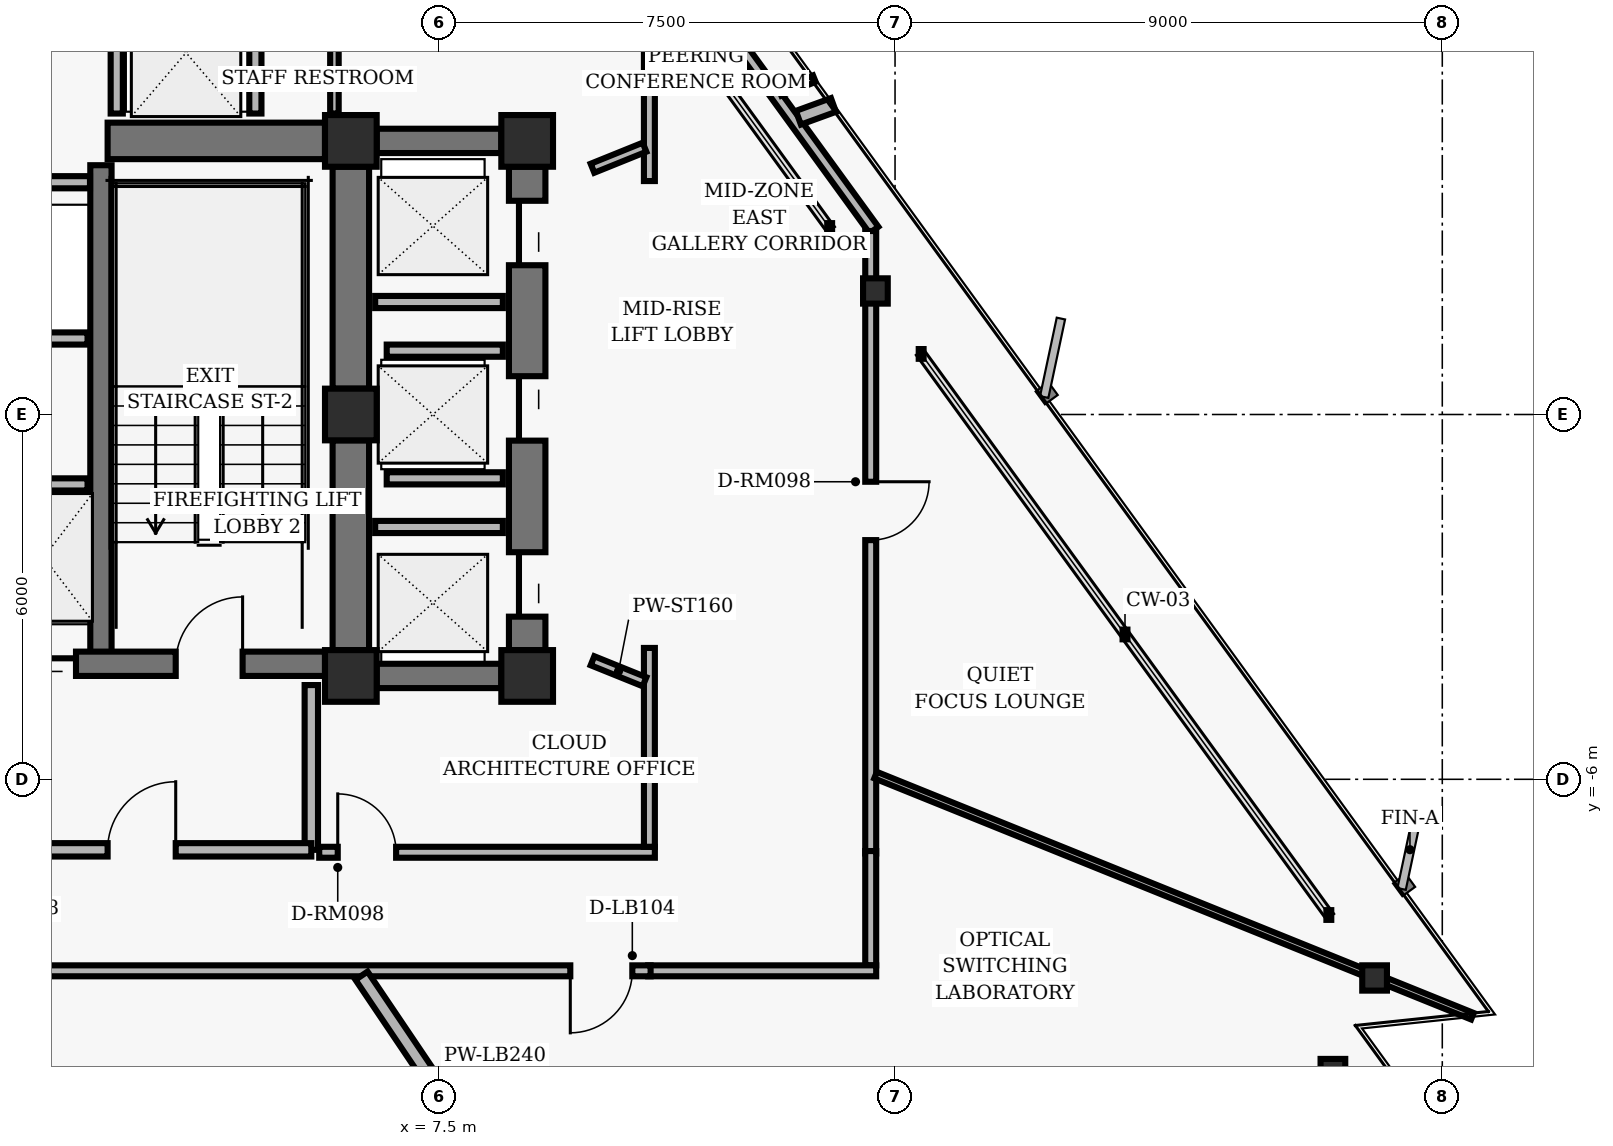
"""IFC4 building model, lengths in metres.
Left out: names, types, materials, properties, quantities, classifications, styles, units other than length and angle.
Written with IfcOpenShell. Run it as: python <this file> out.ifc"""

import sys

from ifc_helpers import new_model, si_unit, direction, frame, frame_2d, origin, origin_2d, place, context, subcontext, project, spatial, rectangle, hollow_rectangle, i_section, extrude, element, fill, save


model = new_model("IFC4")
c1 = context("Model", 3, precision=1e-05, world=origin(), true_north=direction((0.0, 1.0)))
c2 = subcontext(c1, "Body", "Model", "MODEL_VIEW")
j1 = project(units=[si_unit("LENGTHUNIT", "METRE"), si_unit("PLANEANGLEUNIT", "RADIAN")], contexts=[c1])
p1 = place(None, origin())
s1 = spatial("IfcSite", under=j1, at=p1, CompositionType="ELEMENT")
p2 = place(p1, origin())
s2 = spatial("IfcBuilding", under=s1, at=p2, CompositionType="ELEMENT")
p3 = place(p2, frame((0.0, 0.0, 122.88)))
s3 = spatial("IfcBuildingStorey", under=s2, at=p3, CompositionType="ELEMENT", Elevation=122.88)
for number, where, z_axis, x_axis in (
    (1, (6.05, 4.5, 0.0), (0.0, 0.0, 1.0), (1.0, 0.0, 0.0)),
    (2, (6.05, 0.0, 0.0), (0.0, 0.0, 1.0), (1.0, 0.0, 0.0)),
    (3, (6.05, -4.3, 0.0), (0.0, 0.0, 1.0), (1.0, 0.0, 0.0)),
    (4, (8.95, 4.5, 0.0), (0.0, 0.0, 1.0), (1.0, 0.0, 0.0)),
    (5, (8.95, -4.3, 0.0), (0.0, 0.0, 1.0), (1.0, 0.0, 0.0)),
):
    element("IfcColumn", number, at=place(p3, frame(where, z_axis=z_axis, x_axis=x_axis)), inside=s3, PredefinedType="COLUMN", context=c2, shape_type="SweptSolid", body=[
        extrude(hollow_rectangle(XDim=0.85, YDim=0.85, WallThickness=0.055, InnerFilletRadius=0.02, OuterFilletRadius=0.04, at=origin_2d()), origin(), (0.0, 0.0, 1.0), 3.04),
    ])
p4 = place(p3, frame((6.05, 0.425, 0.0), z_axis=(0.0, 0.0, 1.0), x_axis=(0.0, 1.0, 0.0)))
e6 = element("IfcWall", 6, at=p4, inside=s3, PredefinedType="SHEAR", context=c2, shape_type="SweptSolid", body=[
    extrude(rectangle(XDim=3.65, YDim=0.6, at=frame_2d((1.825, 0.0))), origin(), (0.0, 0.0, 1.0), 2.618),
])
p5 = place(p3, frame((6.05, -3.875, 0.0), z_axis=(0.0, 0.0, 1.0), x_axis=(0.0, 1.0, 0.0)))
e7 = element("IfcWall", 7, at=p5, inside=s3, PredefinedType="SHEAR", context=c2, shape_type="SweptSolid", body=[
    extrude(rectangle(XDim=3.45, YDim=0.6, at=frame_2d((1.725, 0.0))), origin(), (0.0, 0.0, 1.0), 2.618),
])
p6 = place(p3, frame((1.94, -4.1, 0.0), z_axis=(0.0, 0.0, 1.0), x_axis=(0.0, 1.0, 0.0)))
e8 = element("IfcWall", 8, at=p6, inside=s3, PredefinedType="SHEAR", context=c2, shape_type="SweptSolid", body=[
    extrude(rectangle(XDim=8.2, YDim=0.35, at=frame_2d((4.1, 0.0))), origin(), (0.0, 0.0, 1.0), 2.618),
])
p7 = place(p3, frame((-5.625, -4.1, 0.0), z_axis=(0.0, 0.0, 1.0), x_axis=(1.0, 0.0, 0.0)))
e9 = element("IfcWall", 9, at=p7, inside=s3, PredefinedType="SHEAR", context=c2, shape_type="SweptSolid", body=[
    extrude(rectangle(XDim=11.25, YDim=0.4, at=frame_2d((5.625, 0.0))), origin(), (0.0, 0.0, 1.0), 2.618),
])
p8 = place(p7, frame((1.355, 0.0, 0.0)))
e10 = element("IfcOpeningElement", 10, at=p8, cuts=e9, PredefinedType="OPENING", context=c2, shape_type="SweptSolid", body=[
    extrude(rectangle(XDim=1.1, YDim=2.04, at=frame_2d((0.55, 1.02))), frame((0.0, 0.21, 0.0), z_axis=(0.0, -1.0, 0.0), x_axis=(1.0, 0.0, 0.0)), (0.0, 0.0, 1.0), 0.42),
])
p9 = place(p7, frame((8.795, 0.0, 0.0)))
e11 = element("IfcOpeningElement", 11, at=p9, cuts=e9, PredefinedType="OPENING", context=c2, shape_type="SweptSolid", body=[
    extrude(rectangle(XDim=1.1, YDim=2.04, at=frame_2d((0.55, 1.02))), frame((0.0, 0.21, 0.0), z_axis=(0.0, -1.0, 0.0), x_axis=(1.0, 0.0, 0.0)), (0.0, 0.0, 1.0), 0.42),
])
p10 = place(p7, frame((4.095, 0.0, 0.0)))
e12 = element("IfcOpeningElement", 12, at=p10, cuts=e9, PredefinedType="OPENING", context=c2, shape_type="SweptSolid", body=[
    extrude(rectangle(XDim=1.06, YDim=2.04, at=frame_2d((0.53, 1.02))), frame((0.0, 0.21, 0.0), z_axis=(0.0, -1.0, 0.0), x_axis=(1.0, 0.0, 0.0)), (0.0, 0.0, 1.0), 0.42),
])
p11 = place(p7, frame((6.095, 0.0, 0.0)))
e13 = element("IfcOpeningElement", 13, at=p11, cuts=e9, PredefinedType="OPENING", context=c2, shape_type="SweptSolid", body=[
    extrude(rectangle(XDim=1.06, YDim=2.04, at=frame_2d((0.53, 1.02))), frame((0.0, 0.21, 0.0), z_axis=(0.0, -1.0, 0.0), x_axis=(1.0, 0.0, 0.0)), (0.0, 0.0, 1.0), 0.42),
])
p12 = place(p3, frame((2.05, 4.5, 0.0), z_axis=(0.0, 0.0, 1.0), x_axis=(1.0, 0.0, 0.0)))
e14 = element("IfcWall", 14, at=p12, inside=s3, PredefinedType="SHEAR", context=c2, shape_type="SweptSolid", body=[
    extrude(rectangle(XDim=3.575, YDim=0.6, at=frame_2d((1.788, 0.0))), origin(), (0.0, 0.0, 1.0), 2.618),
])
p13 = place(p3, frame((8.95, -3.875, 0.0), z_axis=(0.0, 0.0, 1.0), x_axis=(0.0, 1.0, 0.0)))
e15 = element("IfcWall", 15, at=p13, inside=s3, PredefinedType="SHEAR", context=c2, shape_type="SweptSolid", body=[
    extrude(rectangle(XDim=7.95, YDim=0.6, at=frame_2d((3.975, 0.0))), origin(), (0.0, 0.0, 1.0), 2.618),
])
p14 = place(p13, frame((0.55, 0.0, 0.0)))
e16 = element("IfcOpeningElement", 16, at=p14, cuts=e15, PredefinedType="OPENING", context=c2, shape_type="SweptSolid", body=[
    extrude(rectangle(XDim=1.06, YDim=2.04, at=frame_2d((0.53, 1.02))), frame((0.0, 0.31, 0.0), z_axis=(0.0, -1.0, 0.0), x_axis=(1.0, 0.0, 0.0)), (0.0, 0.0, 1.0), 0.62),
])
p15 = place(p13, frame((3.445, 0.0, 0.0)))
e17 = element("IfcOpeningElement", 17, at=p15, cuts=e15, PredefinedType="OPENING", context=c2, shape_type="SweptSolid", body=[
    extrude(rectangle(XDim=1.06, YDim=2.04, at=frame_2d((0.53, 1.02))), frame((0.0, 0.31, 0.0), z_axis=(0.0, -1.0, 0.0), x_axis=(1.0, 0.0, 0.0)), (0.0, 0.0, 1.0), 0.62),
])
p16 = place(p13, frame((6.33, 0.0, 0.0)))
e18 = element("IfcOpeningElement", 18, at=p16, cuts=e15, PredefinedType="OPENING", context=c2, shape_type="SweptSolid", body=[
    extrude(rectangle(XDim=1.06, YDim=2.04, at=frame_2d((0.53, 1.02))), frame((0.0, 0.31, 0.0), z_axis=(0.0, -1.0, 0.0), x_axis=(1.0, 0.0, 0.0)), (0.0, 0.0, 1.0), 0.62),
])
for number, where, z_axis, x_axis in (
    (19, (6.475, 4.5, 0.0), (0.0, 0.0, 1.0), (1.0, 0.0, 0.0)),
    (20, (6.475, -4.3, 0.0), (0.0, 0.0, 1.0), (1.0, 0.0, 0.0)),
):
    element("IfcWall", number, at=place(p3, frame(where, z_axis=z_axis, x_axis=x_axis)), inside=s3, PredefinedType="SHEAR", context=c2, shape_type="SweptSolid", body=[
        extrude(rectangle(XDim=2.05, YDim=0.4, at=frame_2d((1.025, 0.0))), origin(), (0.0, 0.0, 1.0), 2.618),
    ])
for number, where, z_axis, x_axis in (
    (21, (22.887, -9.268, 0.0), (0.0, 0.0, 1.0), (1.0, 0.0, 0.0)),
    (22, (14.677, 2.032, 0.0), (0.0, 0.0, 1.0), (1.0, 0.0, 0.0)),
    (23, (22.201, -10.807, 0.0), (0.0, 0.0, 1.0), (1.0, 0.0, 0.0)),
):
    element("IfcColumn", number, at=place(p3, frame(where, z_axis=z_axis, x_axis=x_axis)), inside=s3, PredefinedType="COLUMN", context=c2, shape_type="SweptSolid", body=[
        extrude(i_section(OverallWidth=0.406, OverallDepth=0.416, WebThickness=0.03, FlangeThickness=0.048, FilletRadius=0.02, at=origin_2d()), origin(), (0.0, 0.0, 1.0), 3.04),
    ])
p17 = place(p3, frame((-1.72, -1.15, 0.0), z_axis=(0.0, 0.0, 1.0), x_axis=(1.0, 0.0, 0.0)))
e24 = element("IfcWall", 24, at=p17, inside=s3, PredefinedType="PARTITIONING", context=c2, shape_type="SweptSolid", body=[
    extrude(rectangle(XDim=3.44, YDim=0.2, at=frame_2d((1.72, 0.0))), origin(), (0.0, 0.0, 1.0), 2.593),
])
p18 = place(p3, frame((5.4, -7.16, 0.0), z_axis=(0.0, 0.0, 1.0), x_axis=(0.0, 1.0, 0.0)))
e25 = element("IfcWall", 25, at=p18, inside=s3, PredefinedType="PARTITIONING", context=c2, shape_type="SweptSolid", body=[
    extrude(rectangle(XDim=2.71, YDim=0.22, at=frame_2d((1.355, 0.0))), origin(), (0.0, 0.0, 1.0), 2.593),
])
p19 = place(p3, frame((0.0, -7.16, 0.0), z_axis=(0.0, 0.0, 1.0), x_axis=(1.0, 0.0, 0.0)))
e26 = element("IfcWall", 26, at=p19, inside=s3, PredefinedType="PARTITIONING", context=c2, shape_type="SweptSolid", body=[
    extrude(rectangle(XDim=5.4, YDim=0.22, at=frame_2d((2.7, 0.0))), origin(), (0.0, 0.0, 1.0), 2.16),
])
p20 = place(p19, frame((2.05, 0.0, 0.0)))
e27 = element("IfcOpeningElement", 27, at=p20, cuts=e26, PredefinedType="OPENING", context=c2, shape_type="SweptSolid", body=[
    extrude(rectangle(XDim=1.12, YDim=2.02, at=frame_2d((0.56, 1.01))), frame((0.0, 0.12, 0.0), z_axis=(0.0, -1.0, 0.0), x_axis=(1.0, 0.0, 0.0)), (0.0, 0.0, 1.0), 0.24),
])
p21 = place(p3, frame((-1.72, 1.25, 0.0), z_axis=(0.0, 0.0, 1.0), x_axis=(1.0, 0.0, 0.0)))
e28 = element("IfcWall", 28, at=p21, inside=s3, PredefinedType="PARTITIONING", context=c2, shape_type="SweptSolid", body=[
    extrude(rectangle(XDim=3.44, YDim=0.2, at=frame_2d((1.72, 0.0))), origin(), (0.0, 0.0, 1.0), 2.593),
])
p22 = place(p3, frame((-1.76, 3.82, 0.0), z_axis=(0.0, 0.0, 1.0), x_axis=(1.0, 0.0, 0.0)))
e29 = element("IfcWall", 29, at=p22, inside=s3, PredefinedType="PARTITIONING", context=c2, shape_type="SweptSolid", body=[
    extrude(rectangle(XDim=3.52, YDim=0.2, at=frame_2d((1.76, 0.0))), origin(), (0.0, 0.0, 1.0), 2.593),
])
p23 = place(p3, frame((2.2, 4.95, 0.0), z_axis=(0.0, 0.0, 1.0), x_axis=(0.0, 1.0, 0.0)))
e30 = element("IfcWall", 30, at=p23, inside=s3, PredefinedType="PARTITIONING", context=c2, shape_type="SweptSolid", body=[
    extrude(rectangle(XDim=2.1, YDim=0.2, at=frame_2d((1.05, 0.0))), origin(), (0.0, 0.0, 1.0), 1.962),
])
p24 = place(p3, frame((4.48, 4.95, 0.0), z_axis=(0.0, 0.0, 1.0), x_axis=(0.0, 1.0, 0.0)))
e31 = element("IfcWall", 31, at=p24, inside=s3, PredefinedType="PARTITIONING", context=c2, shape_type="SweptSolid", body=[
    extrude(rectangle(XDim=2.1, YDim=0.2, at=frame_2d((1.05, 0.0))), origin(), (0.0, 0.0, 1.0), 2.593),
])
p25 = place(p3, frame((5.78, 4.95, 0.0), z_axis=(0.0, 0.0, 1.0), x_axis=(0.0, 1.0, 0.0)))
e32 = element("IfcWall", 32, at=p25, inside=s3, PredefinedType="PARTITIONING", context=c2, shape_type="SweptSolid", body=[
    extrude(rectangle(XDim=2.1, YDim=0.14, at=frame_2d((1.05, 0.0))), origin(), (0.0, 0.0, 1.0), 1.962),
])
for number, where, z_axis, x_axis in (
    (33, (6.45, -1.85, 0.0), (0.0, 0.0, 1.0), (1.0, 0.0, 0.0)),
    (34, (6.45, 1.85, 0.0), (0.0, 0.0, 1.0), (1.0, 0.0, 0.0)),
):
    element("IfcWall", number, at=place(p3, frame(where, z_axis=z_axis, x_axis=x_axis)), inside=s3, PredefinedType="PARTITIONING", context=c2, shape_type="SweptSolid", body=[
        extrude(rectangle(XDim=2.1, YDim=0.2, at=frame_2d((1.05, 0.0))), origin(), (0.0, 0.0, 1.0), 2.593),
    ])
for number, where, z_axis, x_axis in (
    (35, (6.64, -1.05, 0.0), (0.0, 0.0, 1.0), (1.0, 0.0, 0.0)),
    (36, (6.64, 1.05, 0.0), (0.0, 0.0, 1.0), (1.0, 0.0, 0.0)),
):
    element("IfcWall", number, at=place(p3, frame(where, z_axis=z_axis, x_axis=x_axis)), inside=s3, PredefinedType="PARTITIONING", context=c2, shape_type="SweptSolid", body=[
        extrude(rectangle(XDim=1.91, YDim=0.2, at=frame_2d((0.955, 0.0))), origin(), (0.0, 0.0, 1.0), 2.593),
    ])
p26 = place(p3, frame((10.263, 9.077, 0.0), z_axis=(0.0, 0.0, 1.0), x_axis=(0.587780951295, -0.809020119215, 0.0)))
e37 = element("IfcWall", 37, at=p26, inside=s3, PredefinedType="PARTITIONING", context=c2, shape_type="SweptSolid", body=[
    extrude(rectangle(XDim=7.469, YDim=0.18, at=frame_2d((3.734, 0.0))), origin(), (0.0, 0.0, 1.0), 2.593),
])
p27 = place(p3, frame((14.6, 3.018, 0.0), z_axis=(0.0, 0.0, 1.0), x_axis=(0.0, -1.0, 0.0)))
e38 = element("IfcWall", 38, at=p27, inside=s3, PredefinedType="PARTITIONING", context=c2, shape_type="SweptSolid", body=[
    extrude(rectangle(XDim=10.238, YDim=0.18, at=frame_2d((5.119, 0.0))), origin(), (0.0, 0.0, 1.0), 2.593),
])
p28 = place(p27, frame((4.124, 0.0, 0.0)))
e39 = element("IfcOpeningElement", 39, at=p28, cuts=e38, PredefinedType="OPENING", context=c2, shape_type="SweptSolid", body=[
    extrude(rectangle(XDim=0.96, YDim=2.02, at=frame_2d((0.48, 1.01))), frame((0.0, 0.1, 0.0), z_axis=(0.0, -1.0, 0.0), x_axis=(1.0, 0.0, 0.0)), (0.0, 0.0, 1.0), 0.2),
])
p29 = place(p3, frame((14.6, -7.18, 0.0), z_axis=(0.0, 0.0, 1.0), x_axis=(0.0, -1.0, 0.0)))
e40 = element("IfcWall", 40, at=p29, inside=s3, PredefinedType="PARTITIONING", context=c2, shape_type="SweptSolid", body=[
    extrude(rectangle(XDim=1.88, YDim=0.18, at=frame_2d((0.94, 0.0))), origin(), (0.0, 0.0, 1.0), 2.593),
])
p30 = place(p3, frame((14.69, -9.15, 0.0), z_axis=(0.0, 0.0, 1.0), x_axis=(-1.0, 0.0, 0.0)))
e41 = element("IfcWall", 41, at=p30, inside=s3, PredefinedType="PARTITIONING", context=c2, shape_type="SweptSolid", body=[
    extrude(rectangle(XDim=3.75, YDim=0.18, at=frame_2d((1.875, 0.0))), origin(), (0.0, 0.0, 1.0), 2.16),
])
p31 = place(p3, frame((10.98, -9.15, 0.0), z_axis=(0.0, 0.0, 1.0), x_axis=(-1.0, 0.0, 0.0)))
e42 = element("IfcWall", 42, at=p31, inside=s3, PredefinedType="PARTITIONING", context=c2, shape_type="SweptSolid", body=[
    extrude(rectangle(XDim=17.5, YDim=0.18, at=frame_2d((8.75, 0.0))), origin(), (0.0, 0.0, 1.0), 2.16),
])
p32 = place(p31, frame((10.511, 0.0, 0.0)))
e43 = element("IfcOpeningElement", 43, at=p32, cuts=e42, PredefinedType="OPENING", context=c2, shape_type="SweptSolid", body=[
    extrude(rectangle(XDim=0.96, YDim=2.02, at=frame_2d((0.48, 1.01))), frame((0.0, 0.1, 0.0), z_axis=(0.0, -1.0, 0.0), x_axis=(1.0, 0.0, 0.0)), (0.0, 0.0, 1.0), 0.2),
])
p33 = place(p31, frame((0.301, 0.0, 0.0)))
e44 = element("IfcOpeningElement", 44, at=p33, cuts=e42, PredefinedType="OPENING", context=c2, shape_type="SweptSolid", body=[
    extrude(rectangle(XDim=1.02, YDim=2.02, at=frame_2d((0.51, 1.01))), frame((0.0, 0.1, 0.0), z_axis=(0.0, -1.0, 0.0), x_axis=(1.0, 0.0, 0.0)), (0.0, 0.0, 1.0), 0.2),
])
p34 = place(p3, frame((5.53, -7.2, 0.0), z_axis=(0.0, 0.0, 1.0), x_axis=(1.0, 0.0, 0.0)))
e45 = element("IfcWall", 45, at=p34, inside=s3, PredefinedType="PARTITIONING", context=c2, shape_type="SweptSolid", body=[
    extrude(rectangle(XDim=5.52, YDim=0.18, at=frame_2d((2.76, 0.0))), origin(), (0.0, 0.0, 1.0), 2.16),
])
p35 = place(p34, frame((0.305, 0.0, 0.0)))
e46 = element("IfcOpeningElement", 46, at=p35, cuts=e45, PredefinedType="OPENING", context=c2, shape_type="SweptSolid", body=[
    extrude(rectangle(XDim=0.96, YDim=2.02, at=frame_2d((0.48, 1.01))), frame((0.0, 0.1, 0.0), z_axis=(0.0, -1.0, 0.0), x_axis=(1.0, 0.0, 0.0)), (0.0, 0.0, 1.0), 0.2),
])
for number, where, z_axis, x_axis in (
    (47, (10.96, -7.11, 0.0), (0.0, 0.0, 1.0), (0.0, 1.0, 0.0)),
    (48, (10.96, 3.84, 0.0), (0.0, 0.0, 1.0), (0.0, 1.0, 0.0)),
):
    element("IfcWall", number, at=place(p3, frame(where, z_axis=z_axis, x_axis=x_axis)), inside=s3, PredefinedType="PARTITIONING", context=c2, shape_type="SweptSolid", body=[
        extrude(rectangle(XDim=3.271, YDim=0.18, at=frame_2d((1.635, 0.0))), origin(), (0.0, 0.0, 1.0), 2.593),
    ])
p36 = place(p3, frame((6.226, -9.23, 0.0), z_axis=(0.0, 0.0, 1.0), x_axis=(0.559190912305, -0.82903891561, 0.0)))
e49 = element("IfcWall", 49, at=p36, inside=s3, PredefinedType="PARTITIONING", context=c2, shape_type="SweptSolid", body=[
    extrude(rectangle(XDim=5.072, YDim=0.24, at=frame_2d((2.536, 0.0))), origin(), (0.0, 0.0, 1.0), 2.593),
])
p37 = place(p3, frame((10.024, -4.05, 0.0), z_axis=(0.0, 0.0, 1.0), x_axis=(0.927194137639, -0.374581140912, 0.0)))
e50 = element("IfcWall", 50, at=p37, inside=s3, PredefinedType="PARTITIONING", context=c2, shape_type="SweptSolid", body=[
    extrude(rectangle(XDim=0.923, YDim=0.16, at=frame_2d((0.461, 0.0))), origin(), (0.0, 0.0, 1.0), 2.593),
])
p38 = place(p3, frame((14.68, -5.931, 0.0), z_axis=(0.0, 0.0, 1.0), x_axis=(0.927187622353, -0.374597267682, 0.0)))
e51 = element("IfcWall", 51, at=p38, inside=s3, PredefinedType="MOVABLE", context=c2, shape_type="SweptSolid", body=[
    extrude(rectangle(XDim=10.586, YDim=0.115, at=frame_2d((5.293, 0.0))), origin(), (0.0, 0.0, 1.0), 1.962),
])
p39 = place(p3, frame((13.41, 4.881, 0.0), z_axis=(0.0, 0.0, 1.0), x_axis=(0.939828255983, 0.341647258523, 0.0)))
e52 = element("IfcWall", 52, at=p39, inside=s3, PredefinedType="PARTITIONING", context=c2, shape_type="SweptSolid", body=[
    extrude(rectangle(XDim=0.614, YDim=0.24, at=frame_2d((0.307, 0.0))), origin(), (0.0, 0.0, 1.0), 2.593),
])
p40 = place(p3, frame((10.024, 4.05, 0.0), z_axis=(0.0, 0.0, 1.0), x_axis=(0.927194137639, 0.374581140912, 0.0)))
e53 = element("IfcWall", 53, at=p40, inside=s3, PredefinedType="PARTITIONING", context=c2, shape_type="SweptSolid", body=[
    extrude(rectangle(XDim=0.923, YDim=0.16, at=frame_2d((0.461, 0.0))), origin(), (0.0, 0.0, 1.0), 2.593),
])
p41 = place(p3, frame((13.109, 5.296, 0.0), z_axis=(0.0, 0.0, 1.0), x_axis=(0.927169426613, 0.374642301875, 0.0)))
e54 = element("IfcWall", 54, at=p41, inside=s3, PredefinedType="MOVABLE", context=c2, shape_type="SweptSolid", body=[
    extrude(rectangle(XDim=0.608, YDim=0.115, at=frame_2d((0.304, 0.0))), origin(), (0.0, 0.0, 1.0), 2.593),
])
p42 = place(p9, origin())
e55 = element("IfcDoor", 55, at=p42, inside=s3, OperationType="SINGLE_SWING_RIGHT", PredefinedType="DOOR", context=c2, shape_type="SweptSolid", body=[
    extrude(rectangle(XDim=1.1, YDim=2.04, at=frame_2d((0.55, 1.02))), frame((0.0, 0.025, 0.0), z_axis=(0.0, -1.0, 0.0), x_axis=(1.0, 0.0, 0.0)), (0.0, 0.0, 1.0), 0.05),
])
fill(e11, e55)
p43 = place(p11, origin())
e56 = element("IfcDoor", 56, at=p43, inside=s3, OperationType="SLIDING_TO_RIGHT", PredefinedType="DOOR", context=c2, shape_type="SweptSolid", body=[
    extrude(rectangle(XDim=1.06, YDim=2.04, at=frame_2d((0.53, 1.02))), frame((0.0, 0.025, 0.0), z_axis=(0.0, -1.0, 0.0), x_axis=(1.0, 0.0, 0.0)), (0.0, 0.0, 1.0), 0.05),
])
fill(e13, e56)
p44 = place(p20, origin())
e57 = element("IfcDoor", 57, at=p44, inside=s3, OperationType="SINGLE_SWING_RIGHT", PredefinedType="DOOR", context=c2, shape_type="SweptSolid", body=[
    extrude(rectangle(XDim=1.12, YDim=2.02, at=frame_2d((0.56, 1.01))), frame((0.0, 0.025, 0.0), z_axis=(0.0, -1.0, 0.0), x_axis=(1.0, 0.0, 0.0)), (0.0, 0.0, 1.0), 0.05),
])
fill(e27, e57)
p45 = place(p14, origin())
e58 = element("IfcDoor", 58, at=p45, inside=s3, OperationType="SLIDING_TO_LEFT", PredefinedType="DOOR", context=c2, shape_type="SweptSolid", body=[
    extrude(rectangle(XDim=1.06, YDim=2.04, at=frame_2d((0.53, 1.02))), frame((0.0, 0.025, 0.0), z_axis=(0.0, -1.0, 0.0), x_axis=(1.0, 0.0, 0.0)), (0.0, 0.0, 1.0), 0.05),
])
fill(e16, e58)
p46 = place(p15, origin())
e59 = element("IfcDoor", 59, at=p46, inside=s3, OperationType="SLIDING_TO_RIGHT", PredefinedType="DOOR", context=c2, shape_type="SweptSolid", body=[
    extrude(rectangle(XDim=1.06, YDim=2.04, at=frame_2d((0.53, 1.02))), frame((0.0, 0.025, 0.0), z_axis=(0.0, -1.0, 0.0), x_axis=(1.0, 0.0, 0.0)), (0.0, 0.0, 1.0), 0.05),
])
fill(e17, e59)
p47 = place(p16, origin())
e60 = element("IfcDoor", 60, at=p47, inside=s3, OperationType="SLIDING_TO_LEFT", PredefinedType="DOOR", context=c2, shape_type="SweptSolid", body=[
    extrude(rectangle(XDim=1.06, YDim=2.04, at=frame_2d((0.53, 1.02))), frame((0.0, 0.025, 0.0), z_axis=(0.0, -1.0, 0.0), x_axis=(1.0, 0.0, 0.0)), (0.0, 0.0, 1.0), 0.05),
])
fill(e18, e60)
p48 = place(p35, origin())
e61 = element("IfcDoor", 61, at=p48, inside=s3, OperationType="SINGLE_SWING_LEFT", PredefinedType="DOOR", context=c2, shape_type="SweptSolid", body=[
    extrude(rectangle(XDim=0.96, YDim=2.02, at=frame_2d((0.48, 1.01))), frame((0.0, 0.025, 0.0), z_axis=(0.0, -1.0, 0.0), x_axis=(1.0, 0.0, 0.0)), (0.0, 0.0, 1.0), 0.05),
])
fill(e46, e61)
p49 = place(p33, origin())
e62 = element("IfcDoor", 62, at=p49, inside=s3, OperationType="SINGLE_SWING_RIGHT", PredefinedType="DOOR", context=c2, shape_type="SweptSolid", body=[
    extrude(rectangle(XDim=1.02, YDim=2.02, at=frame_2d((0.51, 1.01))), frame((0.0, 0.025, 0.0), z_axis=(0.0, -1.0, 0.0), x_axis=(1.0, 0.0, 0.0)), (0.0, 0.0, 1.0), 0.05),
])
fill(e44, e62)
p50 = place(p28, origin())
e63 = element("IfcDoor", 63, at=p50, inside=s3, OperationType="SINGLE_SWING_LEFT", PredefinedType="DOOR", context=c2, shape_type="SweptSolid", body=[
    extrude(rectangle(XDim=0.96, YDim=2.02, at=frame_2d((0.48, 1.01))), frame((0.0, 0.025, 0.0), z_axis=(0.0, -1.0, 0.0), x_axis=(1.0, 0.0, 0.0)), (0.0, 0.0, 1.0), 0.05),
])
fill(e39, e63)
save(model, sys.argv[1])
